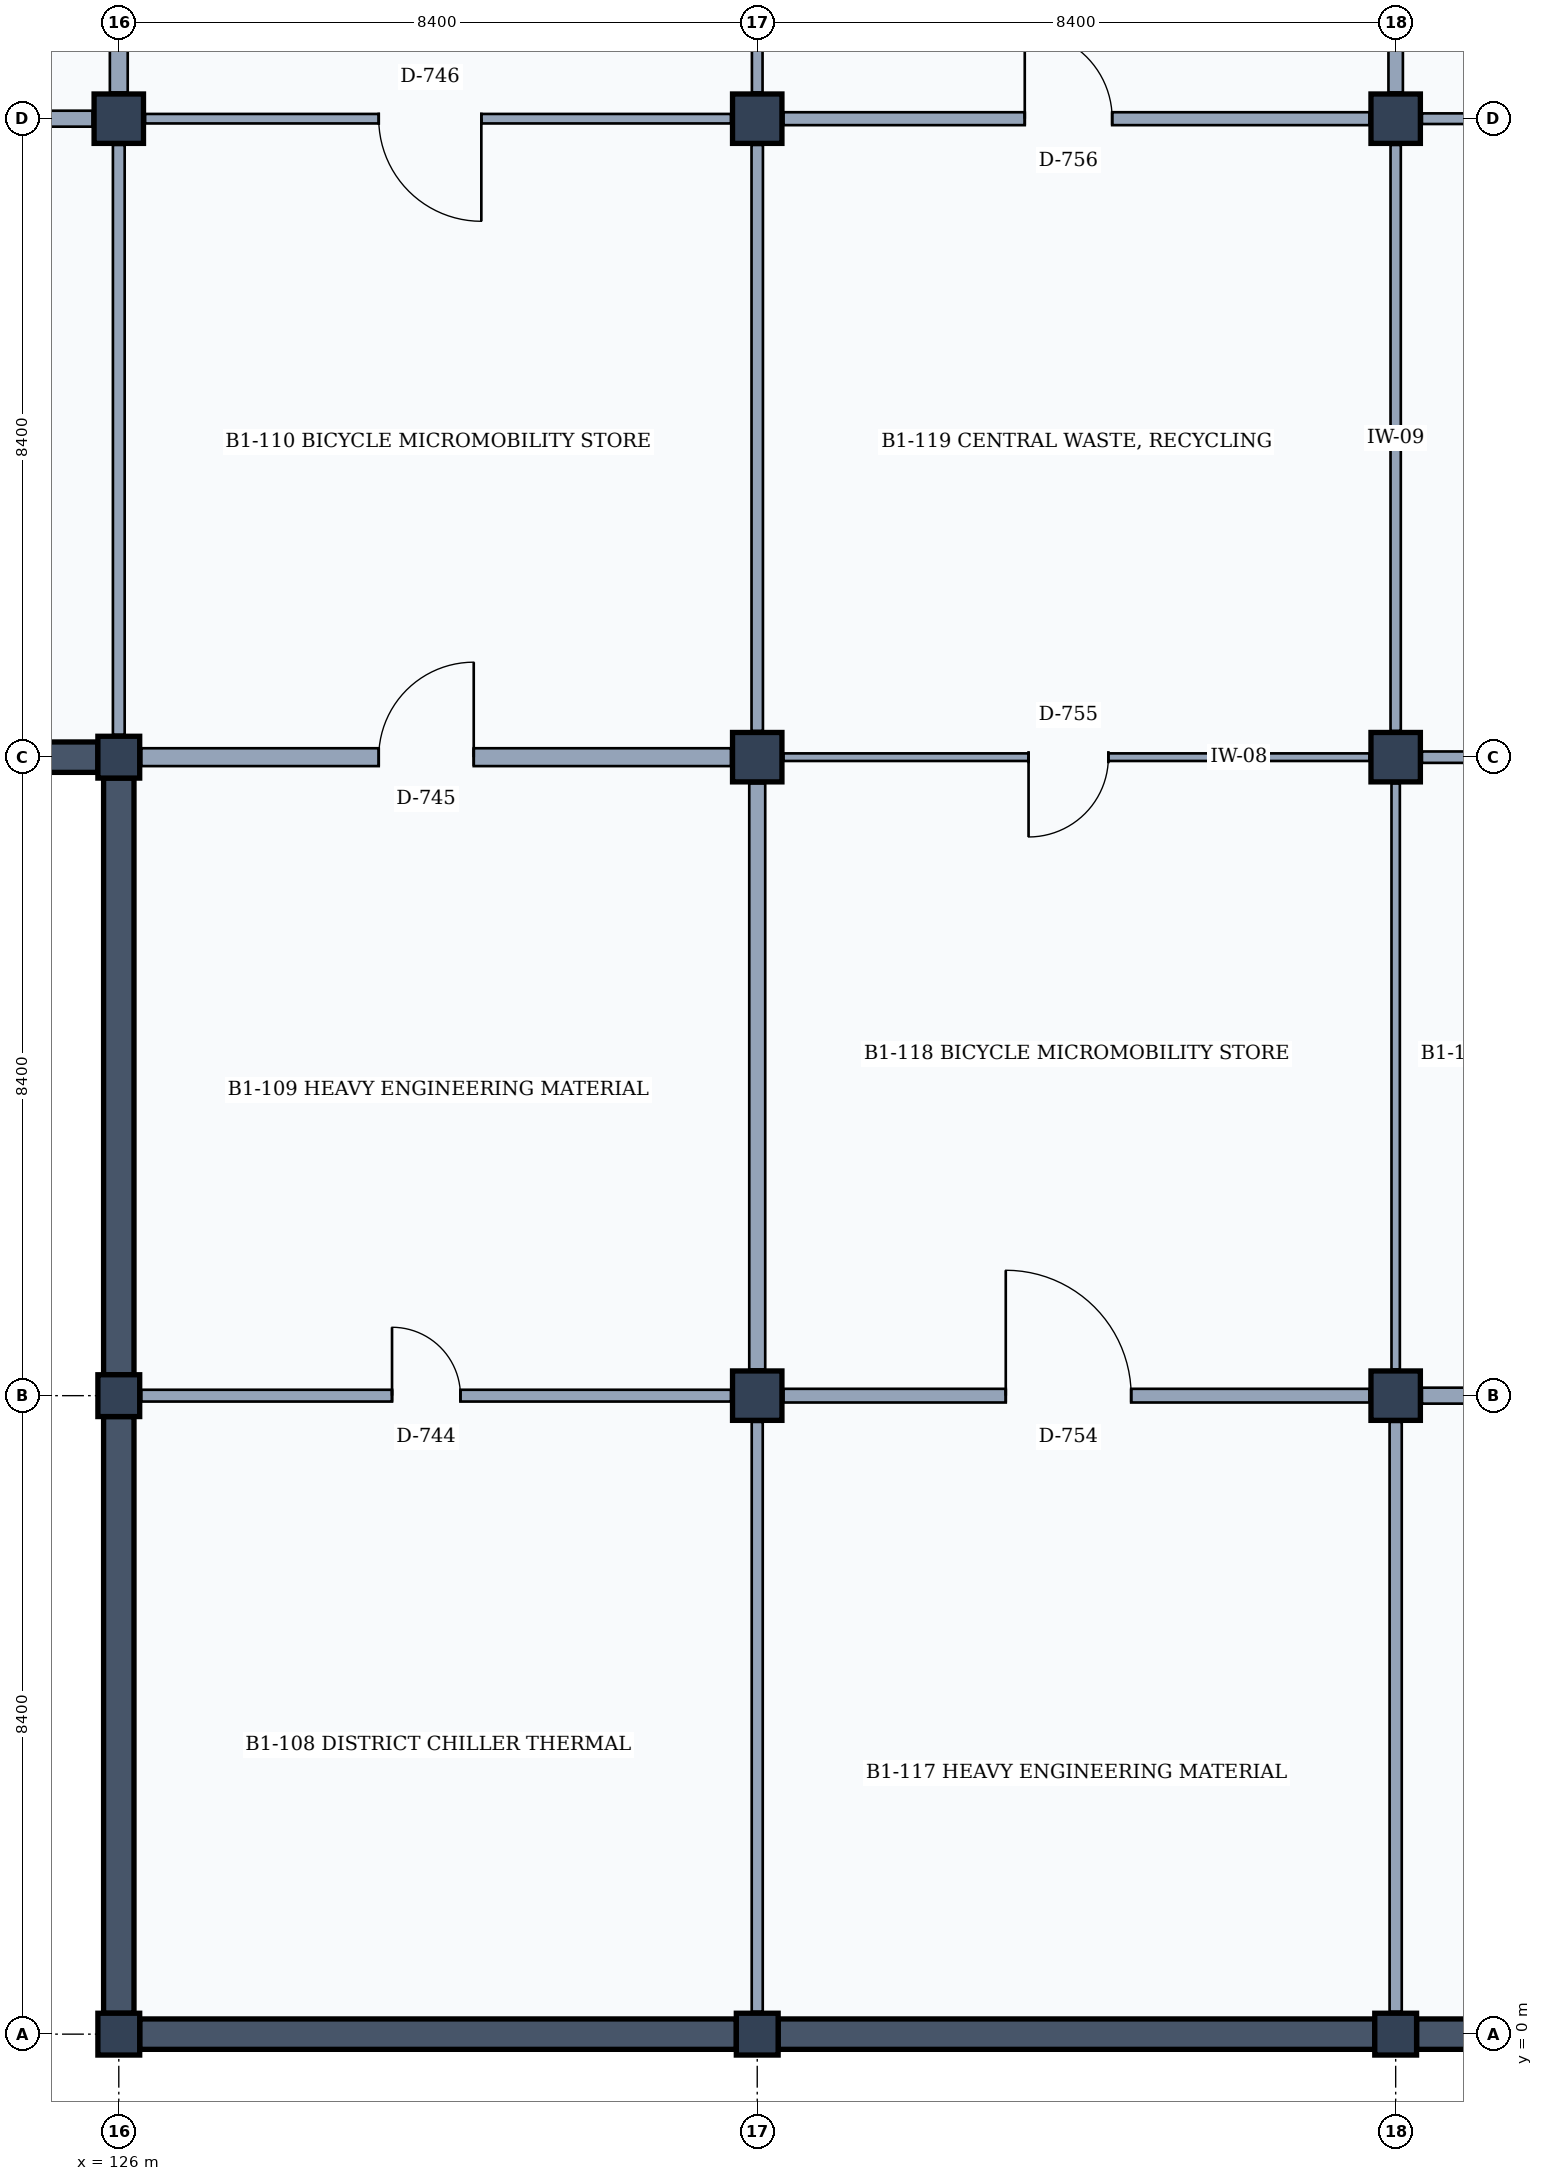
"""IFC4 building model, lengths in metres.
Left out: names, types, materials, properties, quantities, classifications, styles, units other than length and angle.
Written with IfcOpenShell. Run it as: python <this file> out.ifc"""

import sys

from ifc_helpers import new_model, si_unit, direction, frame, frame_2d, origin, origin_2d, place, context, subcontext, project, spatial, rectangle, extrude, element, fill, save


model = new_model("IFC4")
c1 = context("Model", 3, precision=1e-05, world=origin(), true_north=direction((0.0, 1.0)))
c2 = subcontext(c1, "Body", "Model", "MODEL_VIEW")
j1 = project(units=[si_unit("LENGTHUNIT", "METRE"), si_unit("PLANEANGLEUNIT", "RADIAN")], contexts=[c1])
p1 = place(None, origin())
s1 = spatial("IfcSite", under=j1, at=p1, CompositionType="ELEMENT")
p2 = place(p1, origin())
s2 = spatial("IfcBuilding", under=s1, at=p2, CompositionType="ELEMENT")
p3 = place(p2, frame((0.0, 0.0, -4.2)))
s3 = spatial("IfcBuildingStorey", under=s2, at=p3, CompositionType="ELEMENT", Elevation=-4.2)
for number, where, z_axis, x_axis in (
    (1, (126.0, 0.0, 0.0), (0.0, 0.0, 1.0), (1.0, 0.0, 0.0)),
    (2, (126.0, 8.4, 0.0), (0.0, 0.0, 1.0), (1.0, 0.0, 0.0)),
    (3, (126.0, 16.8, 0.0), (0.0, 0.0, 1.0), (1.0, 0.0, 0.0)),
):
    element("IfcColumn", number, at=place(p3, frame(where, z_axis=z_axis, x_axis=x_axis)), inside=s3, PredefinedType="COLUMN", context=c2, shape_type="SweptSolid", body=[
        extrude(rectangle(XDim=0.55, YDim=0.55, at=origin_2d()), origin(), (0.0, 0.0, 1.0), 4.2),
    ])
p4 = place(p3, frame((126.0, 25.2, 0.0), z_axis=(0.0, 0.0, 1.0), x_axis=(1.0, 0.0, 0.0)))
e4 = element("IfcColumn", 4, at=p4, inside=s3, PredefinedType="COLUMN", context=c2, shape_type="SweptSolid", body=[
    extrude(rectangle(XDim=0.65, YDim=0.65, at=origin_2d()), origin(), (0.0, 0.0, 1.0), 4.2),
])
p5 = place(p3, frame((134.4, 0.0, 0.0), z_axis=(0.0, 0.0, 1.0), x_axis=(1.0, 0.0, 0.0)))
e5 = element("IfcColumn", 5, at=p5, inside=s3, PredefinedType="COLUMN", context=c2, shape_type="SweptSolid", body=[
    extrude(rectangle(XDim=0.55, YDim=0.55, at=origin_2d()), origin(), (0.0, 0.0, 1.0), 4.2),
])
for number, where, z_axis, x_axis in (
    (6, (134.4, 8.4, 0.0), (0.0, 0.0, 1.0), (1.0, 0.0, 0.0)),
    (7, (134.4, 16.8, 0.0), (0.0, 0.0, 1.0), (1.0, 0.0, 0.0)),
    (8, (134.4, 25.2, 0.0), (0.0, 0.0, 1.0), (1.0, 0.0, 0.0)),
):
    element("IfcColumn", number, at=place(p3, frame(where, z_axis=z_axis, x_axis=x_axis)), inside=s3, PredefinedType="COLUMN", context=c2, shape_type="SweptSolid", body=[
        extrude(rectangle(XDim=0.65, YDim=0.65, at=origin_2d()), origin(), (0.0, 0.0, 1.0), 4.2),
    ])
p6 = place(p3, frame((142.8, 0.0, 0.0), z_axis=(0.0, 0.0, 1.0), x_axis=(1.0, 0.0, 0.0)))
e9 = element("IfcColumn", 9, at=p6, inside=s3, PredefinedType="COLUMN", context=c2, shape_type="SweptSolid", body=[
    extrude(rectangle(XDim=0.55, YDim=0.55, at=origin_2d()), origin(), (0.0, 0.0, 1.0), 4.2),
])
for number, where, z_axis, x_axis in (
    (10, (142.8, 8.4, 0.0), (0.0, 0.0, 1.0), (1.0, 0.0, 0.0)),
    (11, (142.8, 16.8, 0.0), (0.0, 0.0, 1.0), (1.0, 0.0, 0.0)),
    (12, (142.8, 25.2, 0.0), (0.0, 0.0, 1.0), (1.0, 0.0, 0.0)),
):
    element("IfcColumn", number, at=place(p3, frame(where, z_axis=z_axis, x_axis=x_axis)), inside=s3, PredefinedType="COLUMN", context=c2, shape_type="SweptSolid", body=[
        extrude(rectangle(XDim=0.65, YDim=0.65, at=origin_2d()), origin(), (0.0, 0.0, 1.0), 4.2),
    ])
for number, where, z_axis, x_axis in (
    (13, (125.725, 16.8, 0.0), (0.0, 0.0, 1.0), (-1.0, 0.0, 0.0)),
    (14, (134.125, 0.0, 0.0), (0.0, 0.0, 1.0), (-1.0, 0.0, 0.0)),
    (15, (126.0, 0.275, 0.0), (0.0, 0.0, 1.0), (0.0, 1.0, 0.0)),
):
    element("IfcWall", number, at=place(p3, frame(where, z_axis=z_axis, x_axis=x_axis)), inside=s3, PredefinedType="STANDARD", context=c2, shape_type="SweptSolid", body=[
        extrude(rectangle(XDim=7.85, YDim=0.4, at=frame_2d((3.925, 0.0))), origin(), (0.0, 0.0, 1.0), 3.88),
    ])
for number, where, z_axis, x_axis in (
    (16, (126.0, 8.675, 0.0), (0.0, 0.0, 1.0), (0.0, 1.0, 0.0)),
    (17, (142.525, 0.0, 0.0), (0.0, 0.0, 1.0), (-1.0, 0.0, 0.0)),
):
    element("IfcWall", number, at=place(p3, frame(where, z_axis=z_axis, x_axis=x_axis)), inside=s3, PredefinedType="STANDARD", context=c2, shape_type="SweptSolid", body=[
        extrude(rectangle(XDim=7.85, YDim=0.4, at=frame_2d((3.925, 0.0))), origin(), (0.0, 0.0, 1.0), 3.88),
    ])
p7 = place(p3, frame((150.925, 0.0, 0.0), z_axis=(0.0, 0.0, 1.0), x_axis=(-1.0, 0.0, 0.0)))
e18 = element("IfcWall", 18, at=p7, inside=s3, PredefinedType="STANDARD", context=c2, shape_type="SweptSolid", body=[
    extrude(rectangle(XDim=7.85, YDim=0.4, at=frame_2d((3.925, 0.0))), origin(), (0.0, 0.0, 1.0), 3.88),
])
p8 = place(p3, frame((126.0, 17.095, 0.0), z_axis=(0.0, 0.0, 1.0), x_axis=(0.0, 1.0, 0.0)))
e19 = element("IfcWall", 19, at=p8, inside=s3, PredefinedType="PARTITIONING", context=c2, shape_type="SweptSolid", body=[
    extrude(rectangle(XDim=7.76, YDim=0.155, at=frame_2d((3.88, 0.0))), origin(), (0.0, 0.0, 1.0), 3.25),
])
p9 = place(p3, frame((117.945, 25.2, 0.0), z_axis=(0.0, 0.0, 1.0), x_axis=(1.0, 0.0, 0.0)))
e20 = element("IfcWall", 20, at=p9, inside=s3, PredefinedType="PARTITIONING", context=c2, shape_type="SweptSolid", body=[
    extrude(rectangle(XDim=7.71, YDim=0.21, at=frame_2d((3.855, 0.0))), origin(), (0.0, 0.0, 1.0), 2.95),
])
p10 = place(p9, frame((3.0, 0.0, 0.0)))
e21 = element("IfcOpeningElement", 21, at=p10, cuts=e20, PredefinedType="OPENING", context=c2, shape_type="SweptSolid", body=[
    extrude(rectangle(XDim=1.5, YDim=2.3, at=frame_2d((0.75, 1.15))), frame((0.0, 0.115, 0.0), z_axis=(0.0, -1.0, 0.0), x_axis=(1.0, 0.0, 0.0)), (0.0, 0.0, 1.0), 0.23),
])
p11 = place(p3, frame((126.0, 25.545, 0.0), z_axis=(0.0, 0.0, 1.0), x_axis=(0.0, 1.0, 0.0)))
e22 = element("IfcWall", 22, at=p11, inside=s3, PredefinedType="PARTITIONING", context=c2, shape_type="SweptSolid", body=[
    extrude(rectangle(XDim=7.71, YDim=0.235, at=frame_2d((3.855, 0.0))), origin(), (0.0, 0.0, 1.0), 3.25),
])
p12 = place(p3, frame((134.4, 0.295, 0.0), z_axis=(0.0, 0.0, 1.0), x_axis=(0.0, 1.0, 0.0)))
e23 = element("IfcWall", 23, at=p12, inside=s3, PredefinedType="PARTITIONING", context=c2, shape_type="SweptSolid", body=[
    extrude(rectangle(XDim=7.76, YDim=0.145, at=frame_2d((3.88, 0.0))), origin(), (0.0, 0.0, 1.0), 3.1),
])
p13 = place(p3, frame((126.295, 8.4, 0.0), z_axis=(0.0, 0.0, 1.0), x_axis=(1.0, 0.0, 0.0)))
e24 = element("IfcWall", 24, at=p13, inside=s3, PredefinedType="PARTITIONING", context=c2, shape_type="SweptSolid", body=[
    extrude(rectangle(XDim=7.76, YDim=0.155, at=frame_2d((3.88, 0.0))), origin(), (0.0, 0.0, 1.0), 2.95),
])
p14 = place(p13, frame((3.3, 0.0, 0.0)))
e25 = element("IfcOpeningElement", 25, at=p14, cuts=e24, PredefinedType="OPENING", context=c2, shape_type="SweptSolid", body=[
    extrude(rectangle(XDim=0.9, YDim=2.1, at=frame_2d((0.45, 1.05))), frame((0.0, 0.087, 0.0), z_axis=(0.0, -1.0, 0.0), x_axis=(1.0, 0.0, 0.0)), (0.0, 0.0, 1.0), 0.175),
])
p15 = place(p3, frame((134.4, 8.745, 0.0), z_axis=(0.0, 0.0, 1.0), x_axis=(0.0, 1.0, 0.0)))
e26 = element("IfcWall", 26, at=p15, inside=s3, PredefinedType="PARTITIONING", context=c2, shape_type="SweptSolid", body=[
    extrude(rectangle(XDim=7.71, YDim=0.21, at=frame_2d((3.855, 0.0))), origin(), (0.0, 0.0, 1.0), 3.1),
])
p16 = place(p3, frame((126.295, 16.8, 0.0), z_axis=(0.0, 0.0, 1.0), x_axis=(1.0, 0.0, 0.0)))
e27 = element("IfcWall", 27, at=p16, inside=s3, PredefinedType="PARTITIONING", context=c2, shape_type="SweptSolid", body=[
    extrude(rectangle(XDim=7.76, YDim=0.235, at=frame_2d((3.88, 0.0))), origin(), (0.0, 0.0, 1.0), 2.95),
])
p17 = place(p16, frame((3.125, 0.0, 0.0)))
e28 = element("IfcOpeningElement", 28, at=p17, cuts=e27, PredefinedType="OPENING", context=c2, shape_type="SweptSolid", body=[
    extrude(rectangle(XDim=1.25, YDim=2.3, at=frame_2d((0.625, 1.15))), frame((0.0, 0.127, 0.0), z_axis=(0.0, -1.0, 0.0), x_axis=(1.0, 0.0, 0.0)), (0.0, 0.0, 1.0), 0.255),
])
p18 = place(p3, frame((134.4, 17.145, 0.0), z_axis=(0.0, 0.0, 1.0), x_axis=(0.0, 1.0, 0.0)))
e29 = element("IfcWall", 29, at=p18, inside=s3, PredefinedType="PARTITIONING", context=c2, shape_type="SweptSolid", body=[
    extrude(rectangle(XDim=7.71, YDim=0.15, at=frame_2d((3.855, 0.0))), origin(), (0.0, 0.0, 1.0), 3.1),
])
p19 = place(p3, frame((126.345, 25.2, 0.0), z_axis=(0.0, 0.0, 1.0), x_axis=(1.0, 0.0, 0.0)))
e30 = element("IfcWall", 30, at=p19, inside=s3, PredefinedType="PARTITIONING", context=c2, shape_type="SweptSolid", body=[
    extrude(rectangle(XDim=7.71, YDim=0.125, at=frame_2d((3.855, 0.0))), origin(), (0.0, 0.0, 1.0), 2.95),
])
p20 = place(p19, frame((3.075, 0.0, 0.0)))
e31 = element("IfcOpeningElement", 31, at=p20, cuts=e30, PredefinedType="OPENING", context=c2, shape_type="SweptSolid", body=[
    extrude(rectangle(XDim=1.35, YDim=2.25, at=frame_2d((0.675, 1.125))), frame((0.0, 0.073, 0.0), z_axis=(0.0, -1.0, 0.0), x_axis=(1.0, 0.0, 0.0)), (0.0, 0.0, 1.0), 0.145),
])
p21 = place(p3, frame((134.4, 25.545, 0.0), z_axis=(0.0, 0.0, 1.0), x_axis=(0.0, 1.0, 0.0)))
e32 = element("IfcWall", 32, at=p21, inside=s3, PredefinedType="PARTITIONING", context=c2, shape_type="SweptSolid", body=[
    extrude(rectangle(XDim=7.71, YDim=0.14, at=frame_2d((3.855, 0.0))), origin(), (0.0, 0.0, 1.0), 3.1),
])
p22 = place(p3, frame((142.8, 0.295, 0.0), z_axis=(0.0, 0.0, 1.0), x_axis=(0.0, 1.0, 0.0)))
e33 = element("IfcWall", 33, at=p22, inside=s3, PredefinedType="PARTITIONING", context=c2, shape_type="SweptSolid", body=[
    extrude(rectangle(XDim=7.76, YDim=0.16, at=frame_2d((3.88, 0.0))), origin(), (0.0, 0.0, 1.0), 3.1),
])
p23 = place(p3, frame((134.745, 8.4, 0.0), z_axis=(0.0, 0.0, 1.0), x_axis=(1.0, 0.0, 0.0)))
e34 = element("IfcWall", 34, at=p23, inside=s3, PredefinedType="PARTITIONING", context=c2, shape_type="SweptSolid", body=[
    extrude(rectangle(XDim=7.71, YDim=0.18, at=frame_2d((3.855, 0.0))), origin(), (0.0, 0.0, 1.0), 3.05),
])
p24 = place(p23, frame((2.925, 0.0, 0.0)))
e35 = element("IfcOpeningElement", 35, at=p24, cuts=e34, PredefinedType="OPENING", context=c2, shape_type="SweptSolid", body=[
    extrude(rectangle(XDim=1.65, YDim=2.25, at=frame_2d((0.825, 1.125))), frame((0.0, 0.1, 0.0), z_axis=(0.0, -1.0, 0.0), x_axis=(1.0, 0.0, 0.0)), (0.0, 0.0, 1.0), 0.2),
])
p25 = place(p3, frame((142.8, 8.745, 0.0), z_axis=(0.0, 0.0, 1.0), x_axis=(0.0, 1.0, 0.0)))
e36 = element("IfcWall", 36, at=p25, inside=s3, PredefinedType="PARTITIONING", context=c2, shape_type="SweptSolid", body=[
    extrude(rectangle(XDim=7.71, YDim=0.11, at=frame_2d((3.855, 0.0))), origin(), (0.0, 0.0, 1.0), 3.1),
])
p26 = place(p3, frame((134.745, 16.8, 0.0), z_axis=(0.0, 0.0, 1.0), x_axis=(1.0, 0.0, 0.0)))
e37 = element("IfcWall", 37, at=p26, inside=s3, PredefinedType="MOVABLE", context=c2, shape_type="SweptSolid", body=[
    extrude(rectangle(XDim=7.71, YDim=0.1, at=frame_2d((3.855, 0.0))), origin(), (0.0, 0.0, 1.0), 3.05),
])
p27 = place(p26, frame((3.225, 0.0, 0.0)))
e38 = element("IfcOpeningElement", 38, at=p27, cuts=e37, PredefinedType="OPENING", context=c2, shape_type="SweptSolid", body=[
    extrude(rectangle(XDim=1.05, YDim=2.2, at=frame_2d((0.525, 1.1))), frame((0.0, 0.06, 0.0), z_axis=(0.0, -1.0, 0.0), x_axis=(1.0, 0.0, 0.0)), (0.0, 0.0, 1.0), 0.12),
])
p28 = place(p3, frame((142.8, 17.145, 0.0), z_axis=(0.0, 0.0, 1.0), x_axis=(0.0, 1.0, 0.0)))
e39 = element("IfcWall", 39, at=p28, inside=s3, PredefinedType="PARTITIONING", context=c2, shape_type="SweptSolid", body=[
    extrude(rectangle(XDim=7.71, YDim=0.135, at=frame_2d((3.855, 0.0))), origin(), (0.0, 0.0, 1.0), 3.1),
])
p29 = place(p3, frame((134.745, 25.2, 0.0), z_axis=(0.0, 0.0, 1.0), x_axis=(1.0, 0.0, 0.0)))
e40 = element("IfcWall", 40, at=p29, inside=s3, PredefinedType="PARTITIONING", context=c2, shape_type="SweptSolid", body=[
    extrude(rectangle(XDim=7.71, YDim=0.17, at=frame_2d((3.855, 0.0))), origin(), (0.0, 0.0, 1.0), 3.05),
])
p30 = place(p29, frame((3.175, 0.0, 0.0)))
e41 = element("IfcOpeningElement", 41, at=p30, cuts=e40, PredefinedType="OPENING", context=c2, shape_type="SweptSolid", body=[
    extrude(rectangle(XDim=1.15, YDim=2.25, at=frame_2d((0.575, 1.125))), frame((0.0, 0.095, 0.0), z_axis=(0.0, -1.0, 0.0), x_axis=(1.0, 0.0, 0.0)), (0.0, 0.0, 1.0), 0.19),
])
p31 = place(p3, frame((142.8, 25.545, 0.0), z_axis=(0.0, 0.0, 1.0), x_axis=(0.0, 1.0, 0.0)))
e42 = element("IfcWall", 42, at=p31, inside=s3, PredefinedType="PARTITIONING", context=c2, shape_type="SweptSolid", body=[
    extrude(rectangle(XDim=7.71, YDim=0.19, at=frame_2d((3.855, 0.0))), origin(), (0.0, 0.0, 1.0), 3.1),
])
p32 = place(p3, frame((143.145, 8.4, 0.0), z_axis=(0.0, 0.0, 1.0), x_axis=(1.0, 0.0, 0.0)))
e43 = element("IfcWall", 43, at=p32, inside=s3, PredefinedType="PARTITIONING", context=c2, shape_type="SweptSolid", body=[
    extrude(rectangle(XDim=7.71, YDim=0.21, at=frame_2d((3.855, 0.0))), origin(), (0.0, 0.0, 1.0), 3.05),
])
p33 = place(p32, frame((2.85, 0.0, 0.0)))
e44 = element("IfcOpeningElement", 44, at=p33, cuts=e43, PredefinedType="OPENING", context=c2, shape_type="SweptSolid", body=[
    extrude(rectangle(XDim=1.8, YDim=2.3, at=frame_2d((0.9, 1.15))), frame((0.0, 0.115, 0.0), z_axis=(0.0, -1.0, 0.0), x_axis=(1.0, 0.0, 0.0)), (0.0, 0.0, 1.0), 0.23),
])
p34 = place(p3, frame((143.145, 16.8, 0.0), z_axis=(0.0, 0.0, 1.0), x_axis=(1.0, 0.0, 0.0)))
e45 = element("IfcWall", 45, at=p34, inside=s3, PredefinedType="PARTITIONING", context=c2, shape_type="SweptSolid", body=[
    extrude(rectangle(XDim=7.71, YDim=0.15, at=frame_2d((3.855, 0.0))), origin(), (0.0, 0.0, 1.0), 3.05),
])
p35 = place(p34, frame((3.15, 0.0, 0.0)))
e46 = element("IfcOpeningElement", 46, at=p35, cuts=e45, PredefinedType="OPENING", context=c2, shape_type="SweptSolid", body=[
    extrude(rectangle(XDim=1.2, YDim=2.2, at=frame_2d((0.6, 1.1))), frame((0.0, 0.085, 0.0), z_axis=(0.0, -1.0, 0.0), x_axis=(1.0, 0.0, 0.0)), (0.0, 0.0, 1.0), 0.17),
])
p36 = place(p3, frame((143.145, 25.2, 0.0), z_axis=(0.0, 0.0, 1.0), x_axis=(1.0, 0.0, 0.0)))
e47 = element("IfcWall", 47, at=p36, inside=s3, PredefinedType="PARTITIONING", context=c2, shape_type="SweptSolid", body=[
    extrude(rectangle(XDim=7.61, YDim=0.14, at=frame_2d((3.805, 0.0))), origin(), (0.0, 0.0, 1.0), 3.05),
])
p37 = place(p36, frame((3.05, 0.0, 0.0)))
e48 = element("IfcOpeningElement", 48, at=p37, cuts=e47, PredefinedType="OPENING", context=c2, shape_type="SweptSolid", body=[
    extrude(rectangle(XDim=1.4, YDim=2.25, at=frame_2d((0.7, 1.125))), frame((0.0, 0.08, 0.0), z_axis=(0.0, -1.0, 0.0), x_axis=(1.0, 0.0, 0.0)), (0.0, 0.0, 1.0), 0.16),
])
p38 = place(p14, origin())
e49 = element("IfcDoor", 49, at=p38, inside=s3, OperationType="SINGLE_SWING_LEFT", PredefinedType="DOOR", context=c2, shape_type="SweptSolid", body=[
    extrude(rectangle(XDim=0.9, YDim=2.1, at=frame_2d((0.45, 1.05))), frame((0.0, 0.025, 0.0), z_axis=(0.0, -1.0, 0.0), x_axis=(1.0, 0.0, 0.0)), (0.0, 0.0, 1.0), 0.05),
])
fill(e25, e49)
p39 = place(p17, origin())
e50 = element("IfcDoor", 50, at=p39, inside=s3, OperationType="SINGLE_SWING_RIGHT", PredefinedType="DOOR", context=c2, shape_type="SweptSolid", body=[
    extrude(rectangle(XDim=1.25, YDim=2.3, at=frame_2d((0.625, 1.15))), frame((0.0, 0.025, 0.0), z_axis=(0.0, -1.0, 0.0), x_axis=(1.0, 0.0, 0.0)), (0.0, 0.0, 1.0), 0.05),
])
fill(e28, e50)
p40 = place(p20, frame((1.35, 0.0, 0.0), z_axis=(0.0, 0.0, 1.0), x_axis=(-1.0, 0.0, 0.0)))
e51 = element("IfcDoor", 51, at=p40, inside=s3, OperationType="SINGLE_SWING_LEFT", PredefinedType="DOOR", context=c2, shape_type="SweptSolid", body=[
    extrude(rectangle(XDim=1.35, YDim=2.25, at=frame_2d((0.675, 1.125))), frame((0.0, 0.025, 0.0), z_axis=(0.0, -1.0, 0.0), x_axis=(1.0, 0.0, 0.0)), (0.0, 0.0, 1.0), 0.05),
])
fill(e31, e51)
p41 = place(p24, origin())
e52 = element("IfcDoor", 52, at=p41, inside=s3, OperationType="SINGLE_SWING_LEFT", PredefinedType="DOOR", context=c2, shape_type="SweptSolid", body=[
    extrude(rectangle(XDim=1.65, YDim=2.25, at=frame_2d((0.825, 1.125))), frame((0.0, 0.025, 0.0), z_axis=(0.0, -1.0, 0.0), x_axis=(1.0, 0.0, 0.0)), (0.0, 0.0, 1.0), 0.05),
])
fill(e35, e52)
p42 = place(p27, frame((1.05, 0.0, 0.0), z_axis=(0.0, 0.0, 1.0), x_axis=(-1.0, 0.0, 0.0)))
e53 = element("IfcDoor", 53, at=p42, inside=s3, OperationType="SINGLE_SWING_RIGHT", PredefinedType="DOOR", context=c2, shape_type="SweptSolid", body=[
    extrude(rectangle(XDim=1.05, YDim=2.2, at=frame_2d((0.525, 1.1))), frame((0.0, 0.025, 0.0), z_axis=(0.0, -1.0, 0.0), x_axis=(1.0, 0.0, 0.0)), (0.0, 0.0, 1.0), 0.05),
])
fill(e38, e53)
p43 = place(p30, origin())
e54 = element("IfcDoor", 54, at=p43, inside=s3, OperationType="SINGLE_SWING_LEFT", PredefinedType="DOOR", context=c2, shape_type="SweptSolid", body=[
    extrude(rectangle(XDim=1.15, YDim=2.25, at=frame_2d((0.575, 1.125))), frame((0.0, 0.025, 0.0), z_axis=(0.0, -1.0, 0.0), x_axis=(1.0, 0.0, 0.0)), (0.0, 0.0, 1.0), 0.05),
])
fill(e41, e54)
save(model, sys.argv[1])
